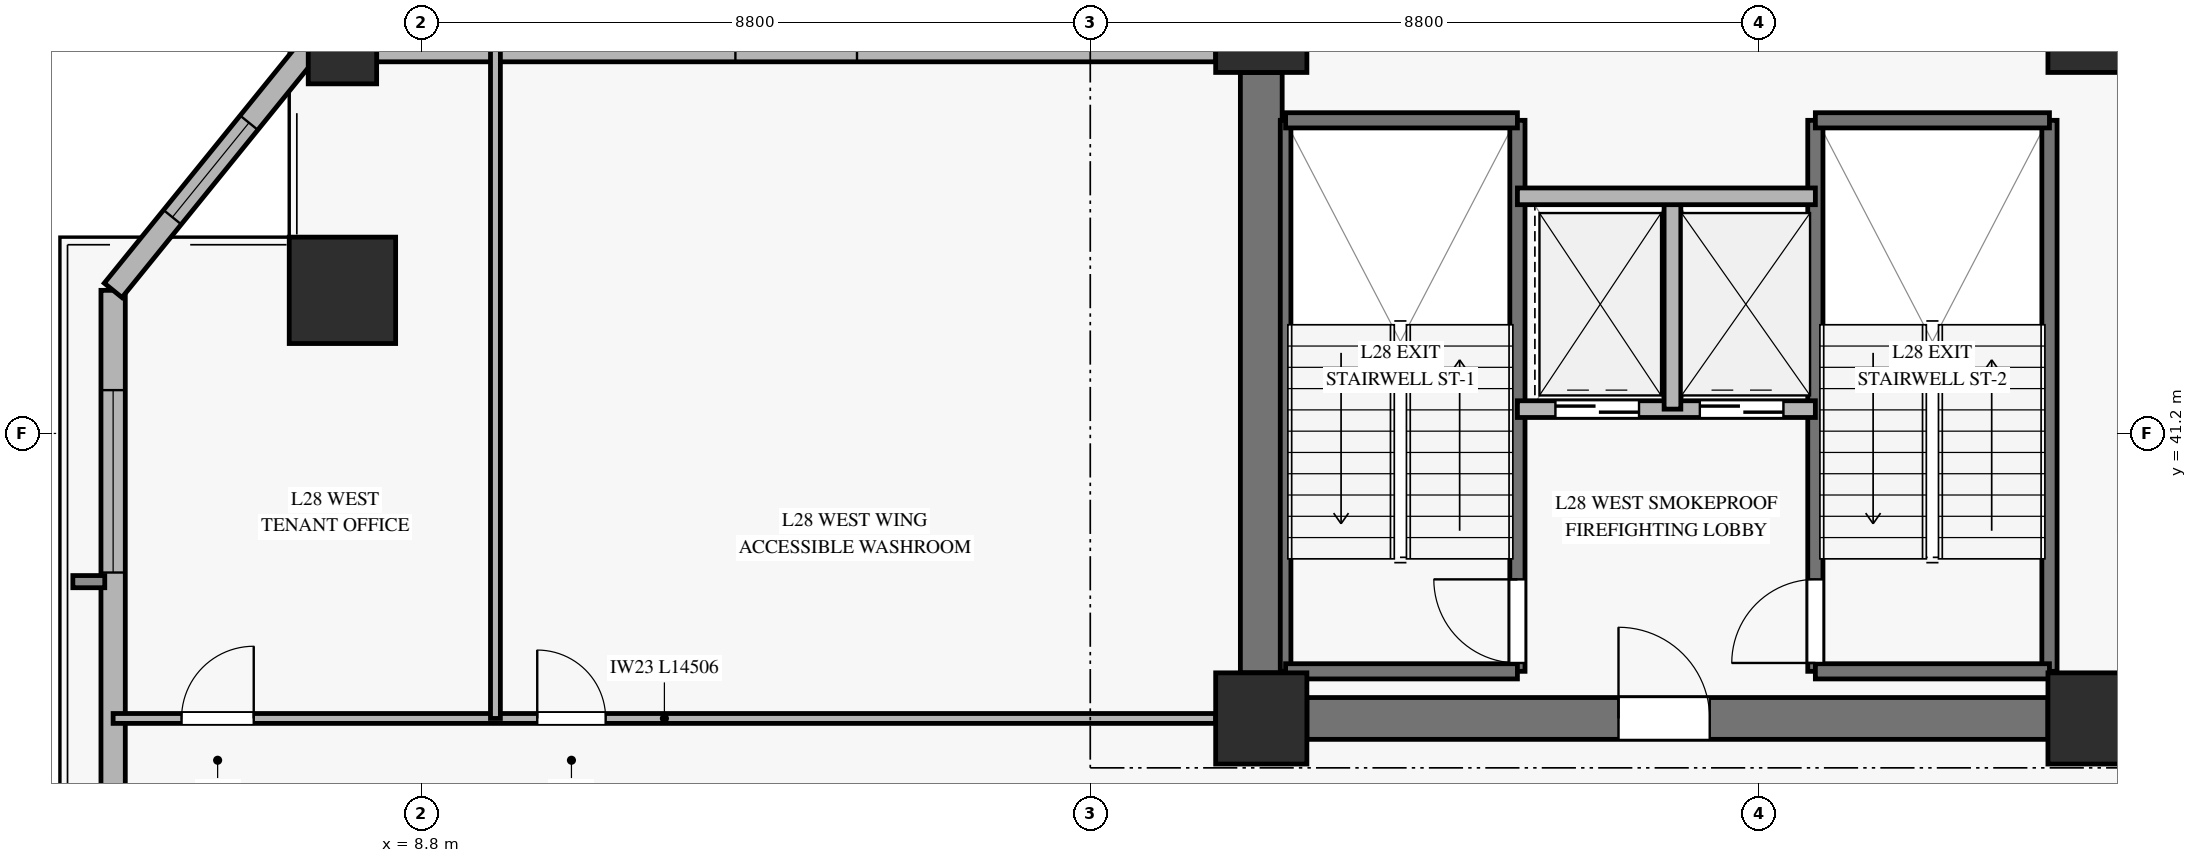
"""IFC4 building model, lengths in metres.
Left out: names, types, materials, properties, quantities, classifications, styles, units other than length and angle.
Written with IfcOpenShell. Run it as: python <this file> out.ifc"""

import sys

from ifc_helpers import new_model, si_unit, direction, frame, frame_2d, origin, origin_2d, place, context, subcontext, project, spatial, rectangle, hollow_rectangle, extrude, source, transform, mapped, element, fill, save


model = new_model("IFC4")
c1 = context("Model", 3, precision=1e-05, world=origin(), true_north=direction((0.0, 1.0)))
c2 = subcontext(c1, "Body", "Model", "MODEL_VIEW")
j1 = project(units=[si_unit("LENGTHUNIT", "METRE"), si_unit("PLANEANGLEUNIT", "RADIAN")], contexts=[c1])
p1 = place(None, origin())
s1 = spatial("IfcSite", under=j1, at=p1, CompositionType="ELEMENT")
p2 = place(p1, origin())
s2 = spatial("IfcBuilding", under=s1, at=p2, CompositionType="ELEMENT")
p3 = place(p2, frame((0.0, 0.0, 115.3)))
s3 = spatial("IfcBuildingStorey", under=s2, at=p3, CompositionType="ELEMENT", Elevation=115.3)
m1 = source(origin(), c2, "Body", "SweptSolid", [
    extrude(rectangle(XDim=1.2, YDim=1.2, at=origin_2d()), origin(), (0.0, 0.0, 1.0), 3.68),
])
for number, where, z_axis, x_axis in (
    (1, (19.85, 37.45, 0.0), (0.0, 0.0, 1.0), (1.0, 0.0, 0.0)),
    (2, (19.85, 46.55, 0.0), (0.0, 0.0, 1.0), (1.0, 0.0, 0.0)),
    (3, (30.8, 37.45, 0.0), (0.0, 0.0, 1.0), (1.0, 0.0, 0.0)),
    (4, (30.8, 46.55, 0.0), (0.0, 0.0, 1.0), (1.0, 0.0, 0.0)),
):
    element("IfcColumn", number, at=place(p3, frame(where, z_axis=z_axis, x_axis=x_axis)), inside=s3, PredefinedType="PILASTER", context=c2, shape_type="MappedRepresentation", body=[
        mapped(m1, transform((0.0, 0.0, 0.0), x_axis=(1.0, 0.0, 0.0), y_axis=(0.0, 1.0, 0.0), z_axis=(0.0, 0.0, 1.0), scale=1.0)),
    ])
p4 = place(p3, frame((20.45, 37.45, 0.0), z_axis=(0.0, 0.0, 1.0), x_axis=(1.0, 0.0, 0.0)))
e5 = element("IfcWall", 5, at=p4, inside=s3, PredefinedType="SHEAR", context=c2, shape_type="SweptSolid", body=[
    extrude(rectangle(XDim=9.75, YDim=0.55, at=frame_2d((4.875, 0.0))), origin(), (0.0, 0.0, 1.0), 3.68),
])
p5 = place(p4, frame((4.1, 0.0, 0.0)))
e6 = element("IfcOpeningElement", 6, at=p5, cuts=e5, PredefinedType="OPENING", context=c2, shape_type="SweptSolid", body=[
    extrude(rectangle(XDim=1.2, YDim=2.15, at=frame_2d((0.6, 1.075))), frame((0.0, 0.285, 0.0), z_axis=(0.0, -1.0, 0.0), x_axis=(1.0, 0.0, 0.0)), (0.0, 0.0, 1.0), 0.57),
])
p6 = place(p3, frame((19.85, 38.05, 0.0), z_axis=(0.0, 0.0, 1.0), x_axis=(0.0, 1.0, 0.0)))
e7 = element("IfcWall", 7, at=p6, inside=s3, PredefinedType="SHEAR", context=c2, shape_type="SweptSolid", body=[
    extrude(rectangle(XDim=7.9, YDim=0.55, at=frame_2d((3.95, 0.0))), origin(), (0.0, 0.0, 1.0), 3.68),
])
m2 = source(origin(), c2, "Body", "SweptSolid", [
    extrude(hollow_rectangle(XDim=1.4, YDim=1.4, WallThickness=0.065, at=origin_2d()), origin(), (0.0, 0.0, 1.0), 3.68),
])
p7 = place(p3, frame((7.761, 43.083, 0.0), z_axis=(0.0, 0.0, 1.0), x_axis=(1.0, 0.0, 0.0)))
e8 = element("IfcColumn", 8, at=p7, inside=s3, PredefinedType="COLUMN", context=c2, shape_type="MappedRepresentation", body=[
    mapped(m2, transform((0.0, 0.0, 0.0), x_axis=(1.0, 0.0, 0.0), y_axis=(0.0, 1.0, 0.0), z_axis=(0.0, 0.0, 1.0), scale=1.0)),
])
m3 = source(origin(), c2, "Body", "SweptSolid", [
    extrude(hollow_rectangle(XDim=0.9, YDim=0.9, WallThickness=0.04, at=origin_2d()), origin(), (0.0, 0.0, 1.0), 3.68),
])
p8 = place(p3, frame((7.761, 46.25, 0.0), z_axis=(0.0, 0.0, 1.0), x_axis=(1.0, 0.0, 0.0)))
e9 = element("IfcColumn", 9, at=p8, inside=s3, PredefinedType="COLUMN", context=c2, shape_type="MappedRepresentation", body=[
    mapped(m3, transform((0.0, 0.0, 0.0), x_axis=(1.0, 0.0, 0.0), y_axis=(0.0, 1.0, 0.0), z_axis=(0.0, 0.0, 1.0), scale=1.0)),
])
p9 = place(p3, frame((4.744, 26.995, 0.0), z_axis=(0.0, 0.0, 1.0), x_axis=(0.0, 1.0, 0.0)))
e10 = element("IfcWall", 10, at=p9, inside=s3, PredefinedType="SOLIDWALL", context=c2, shape_type="SweptSolid", body=[
    extrude(rectangle(XDim=16.088, YDim=0.32, at=frame_2d((8.044, 0.0))), origin(), (0.0, 0.0, 1.0), 3.16),
])
p10 = place(p9, frame((1.22, 0.0, 0.45)))
e11 = element("IfcOpeningElement", 11, at=p10, cuts=e10, PredefinedType="OPENING", context=c2, shape_type="SweptSolid", body=[
    extrude(rectangle(XDim=2.4, YDim=2.1, at=frame_2d((1.2, 1.05))), frame((0.0, 0.17, 0.0), z_axis=(0.0, -1.0, 0.0), x_axis=(1.0, 0.0, 0.0)), (0.0, 0.0, 1.0), 0.34),
])
p11 = place(p9, frame((12.375, 0.0, 0.45)))
e12 = element("IfcOpeningElement", 12, at=p11, cuts=e10, PredefinedType="OPENING", context=c2, shape_type="SweptSolid", body=[
    extrude(rectangle(XDim=2.4, YDim=2.1, at=frame_2d((1.2, 1.05))), frame((0.0, 0.17, 0.0), z_axis=(0.0, -1.0, 0.0), x_axis=(1.0, 0.0, 0.0)), (0.0, 0.0, 1.0), 0.34),
])
p12 = place(p3, frame((8.211, 46.25, 0.0), z_axis=(0.0, 0.0, 1.0), x_axis=(1.0, 0.0, 0.0)))
e13 = element("IfcWall", 13, at=p12, inside=s3, PredefinedType="SOLIDWALL", context=c2, shape_type="SweptSolid", body=[
    extrude(rectangle(XDim=11.039, YDim=0.32, at=frame_2d((5.52, 0.0))), origin(), (0.0, 0.0, 1.0), 3.16),
])
p13 = place(p12, frame((4.72, 0.0, 0.45)))
e14 = element("IfcOpeningElement", 14, at=p13, cuts=e13, PredefinedType="OPENING", context=c2, shape_type="SweptSolid", body=[
    extrude(rectangle(XDim=1.6, YDim=2.0, at=frame_2d((0.8, 1.0))), frame((0.0, 0.17, 0.0), z_axis=(0.0, -1.0, 0.0), x_axis=(1.0, 0.0, 0.0)), (0.0, 0.0, 1.0), 0.34),
])
p14 = place(p3, frame((7.311, 46.25, 0.0), z_axis=(0.0, 0.0, 1.0), x_axis=(-0.629699415949, -0.776838880047, 0.0)))
e15 = element("IfcWall", 15, at=p14, inside=s3, PredefinedType="SOLIDWALL", context=c2, shape_type="SweptSolid", body=[
    extrude(rectangle(XDim=4.077, YDim=0.3, at=frame_2d((2.038, 0.0))), origin(), (0.0, 0.0, 1.0), 3.16),
])
p15 = place(p14, frame((1.238, 0.0, 0.45)))
e16 = element("IfcOpeningElement", 16, at=p15, cuts=e15, PredefinedType="OPENING", context=c2, shape_type="SweptSolid", body=[
    extrude(rectangle(XDim=1.6, YDim=2.0, at=frame_2d((0.8, 1.0))), frame((0.0, 0.16, 0.0), z_axis=(0.0, -1.0, 0.0), x_axis=(1.0, 0.0, 0.0)), (0.0, 0.0, 1.0), 0.32),
])
p16 = place(p3, frame((20.17, 38.07, 0.0), z_axis=(0.0, 0.0, 1.0), x_axis=(0.0, 1.0, 0.0)))
e17 = element("IfcWall", 17, at=p16, inside=s3, PredefinedType="SOLIDWALL", context=c2, shape_type="SweptSolid", body=[
    extrude(rectangle(XDim=7.25, YDim=0.14, at=frame_2d((3.625, 0.0))), origin(), (0.0, 0.0, 1.0), 3.9),
])
p17 = place(p3, frame((23.22, 38.07, 0.0), z_axis=(0.0, 0.0, 1.0), x_axis=(0.0, 1.0, 0.0)))
e18 = element("IfcWall", 18, at=p17, inside=s3, PredefinedType="SOLIDWALL", context=c2, shape_type="SweptSolid", body=[
    extrude(rectangle(XDim=7.25, YDim=0.2, at=frame_2d((3.625, 0.0))), origin(), (0.0, 0.0, 1.0), 3.9),
])
p18 = place(p17, frame((0.11, 0.0, 0.0)))
e19 = element("IfcOpeningElement", 19, at=p18, cuts=e18, PredefinedType="OPENING", context=c2, shape_type="SweptSolid", body=[
    extrude(rectangle(XDim=1.1, YDim=2.15, at=frame_2d((0.55, 1.075))), frame((0.0, 0.11, 0.0), z_axis=(0.0, -1.0, 0.0), x_axis=(1.0, 0.0, 0.0)), (0.0, 0.0, 1.0), 0.22),
])
for number, where, z_axis, x_axis in (
    (20, (20.17, 45.32, 0.0), (0.0, 0.0, 1.0), (1.0, 0.0, 0.0)),
    (21, (20.17, 38.07, 0.0), (0.0, 0.0, 1.0), (1.0, 0.0, 0.0)),
):
    element("IfcWall", number, at=place(p3, frame(where, z_axis=z_axis, x_axis=x_axis)), inside=s3, PredefinedType="SOLIDWALL", context=c2, shape_type="SweptSolid", body=[
        extrude(rectangle(XDim=3.05, YDim=0.2, at=frame_2d((1.525, 0.0))), origin(), (0.0, 0.0, 1.0), 3.9),
    ])
p19 = place(p3, frame((27.14, 38.07, 0.0), z_axis=(0.0, 0.0, 1.0), x_axis=(0.0, 1.0, 0.0)))
e22 = element("IfcWall", 22, at=p19, inside=s3, PredefinedType="SOLIDWALL", context=c2, shape_type="SweptSolid", body=[
    extrude(rectangle(XDim=7.25, YDim=0.2, at=frame_2d((3.625, 0.0))), origin(), (0.0, 0.0, 1.0), 3.9),
])
p20 = place(p19, frame((0.11, 0.0, 0.0)))
e23 = element("IfcOpeningElement", 23, at=p20, cuts=e22, PredefinedType="OPENING", context=c2, shape_type="SweptSolid", body=[
    extrude(rectangle(XDim=1.1, YDim=2.15, at=frame_2d((0.55, 1.075))), frame((0.0, 0.11, 0.0), z_axis=(0.0, -1.0, 0.0), x_axis=(1.0, 0.0, 0.0)), (0.0, 0.0, 1.0), 0.22),
])
p21 = place(p3, frame((30.22, 38.07, 0.0), z_axis=(0.0, 0.0, 1.0), x_axis=(0.0, 1.0, 0.0)))
e24 = element("IfcWall", 24, at=p21, inside=s3, PredefinedType="SOLIDWALL", context=c2, shape_type="SweptSolid", body=[
    extrude(rectangle(XDim=7.25, YDim=0.2, at=frame_2d((3.625, 0.0))), origin(), (0.0, 0.0, 1.0), 3.9),
])
for number, where, z_axis, x_axis in (
    (25, (27.14, 45.32, 0.0), (0.0, 0.0, 1.0), (1.0, 0.0, 0.0)),
    (26, (27.14, 38.07, 0.0), (0.0, 0.0, 1.0), (1.0, 0.0, 0.0)),
):
    element("IfcWall", number, at=place(p3, frame(where, z_axis=z_axis, x_axis=x_axis)), inside=s3, PredefinedType="SOLIDWALL", context=c2, shape_type="SweptSolid", body=[
        extrude(rectangle(XDim=3.08, YDim=0.2, at=frame_2d((1.54, 0.0))), origin(), (0.0, 0.0, 1.0), 3.9),
    ])
p22 = place(p3, frame((23.22, 41.52, 0.0), z_axis=(0.0, 0.0, 1.0), x_axis=(1.0, 0.0, 0.0)))
e27 = element("IfcWall", 27, at=p22, inside=s3, PredefinedType="SOLIDWALL", context=c2, shape_type="SweptSolid", body=[
    extrude(rectangle(XDim=3.92, YDim=0.22, at=frame_2d((1.96, 0.0))), origin(), (0.0, 0.0, 1.0), 3.68),
])
p23 = place(p22, frame((0.5, 0.0, 0.0)))
e28 = element("IfcOpeningElement", 28, at=p23, cuts=e27, PredefinedType="OPENING", context=c2, shape_type="SweptSolid", body=[
    extrude(rectangle(XDim=1.1, YDim=2.2, at=frame_2d((0.55, 1.1))), frame((0.0, 0.12, 0.0), z_axis=(0.0, -1.0, 0.0), x_axis=(1.0, 0.0, 0.0)), (0.0, 0.0, 1.0), 0.24),
])
p24 = place(p22, frame((2.4, 0.0, 0.0)))
e29 = element("IfcOpeningElement", 29, at=p24, cuts=e27, PredefinedType="OPENING", context=c2, shape_type="SweptSolid", body=[
    extrude(rectangle(XDim=1.1, YDim=2.2, at=frame_2d((0.55, 1.1))), frame((0.0, 0.12, 0.0), z_axis=(0.0, -1.0, 0.0), x_axis=(1.0, 0.0, 0.0)), (0.0, 0.0, 1.0), 0.24),
])
p25 = place(p3, frame((25.26, 41.52, 0.0), z_axis=(0.0, 0.0, 1.0), x_axis=(0.0, 1.0, 0.0)))
e30 = element("IfcWall", 30, at=p25, inside=s3, PredefinedType="SOLIDWALL", context=c2, shape_type="SweptSolid", body=[
    extrude(rectangle(XDim=2.8, YDim=0.22, at=frame_2d((1.4, 0.0))), origin(), (0.0, 0.0, 1.0), 3.68),
])
p26 = place(p3, frame((23.22, 44.32, 0.0), z_axis=(0.0, 0.0, 1.0), x_axis=(1.0, 0.0, 0.0)))
e31 = element("IfcWall", 31, at=p26, inside=s3, PredefinedType="SOLIDWALL", context=c2, shape_type="SweptSolid", body=[
    extrude(rectangle(XDim=3.92, YDim=0.22, at=frame_2d((1.96, 0.0))), origin(), (0.0, 0.0, 1.0), 3.68),
])
p27 = place(p3, frame((4.744, 37.45, 0.0), z_axis=(0.0, 0.0, 1.0), x_axis=(1.0, 0.0, 0.0)))
e32 = element("IfcWall", 32, at=p27, inside=s3, PredefinedType="PARTITIONING", context=c2, shape_type="SweptSolid", body=[
    extrude(rectangle(XDim=14.506, YDim=0.13, at=frame_2d((7.253, 0.0))), origin(), (0.0, 0.0, 1.0), 3.165),
])
p28 = place(p27, frame((0.9, 0.0, 0.0)))
e33 = element("IfcOpeningElement", 33, at=p28, cuts=e32, PredefinedType="OPENING", context=c2, shape_type="SweptSolid", body=[
    extrude(rectangle(XDim=0.95, YDim=2.1, at=frame_2d((0.475, 1.05))), frame((0.0, 0.075, 0.0), z_axis=(0.0, -1.0, 0.0), x_axis=(1.0, 0.0, 0.0)), (0.0, 0.0, 1.0), 0.15),
])
p29 = place(p27, frame((5.58, 0.0, 0.0)))
e34 = element("IfcOpeningElement", 34, at=p29, cuts=e32, PredefinedType="OPENING", context=c2, shape_type="SweptSolid", body=[
    extrude(rectangle(XDim=0.9, YDim=2.1, at=frame_2d((0.45, 1.05))), frame((0.0, 0.075, 0.0), z_axis=(0.0, -1.0, 0.0), x_axis=(1.0, 0.0, 0.0)), (0.0, 0.0, 1.0), 0.15),
])
p30 = place(p3, frame((9.774, 37.45, 0.0), z_axis=(0.0, 0.0, 1.0), x_axis=(0.0, 1.0, 0.0)))
e35 = element("IfcWall", 35, at=p30, inside=s3, PredefinedType="PARTITIONING", context=c2, shape_type="SweptSolid", body=[
    extrude(rectangle(XDim=8.8, YDim=0.13, at=frame_2d((4.4, 0.0))), origin(), (0.0, 0.0, 1.0), 3.68),
])
m4 = source(origin(), c2, "Body", "SweptSolid", [
    extrude(rectangle(XDim=2.4, YDim=2.1, at=frame_2d((1.2, 1.05))), frame((0.0, 0.03, 0.0), z_axis=(0.0, -1.0, 0.0), x_axis=(1.0, 0.0, 0.0)), (0.0, 0.0, 1.0), 0.06),
])
p31 = place(p11, origin())
e36 = element("IfcWindow", 36, at=p31, inside=s3, PartitioningType="SINGLE_PANEL", PredefinedType="WINDOW", context=c2, shape_type="MappedRepresentation", body=[
    mapped(m4, transform((0.0, 0.0, 0.0), x_axis=(1.0, 0.0, 0.0), y_axis=(0.0, 1.0, 0.0), z_axis=(0.0, 0.0, 1.0), scale=1.0)),
])
fill(e12, e36)
m5 = source(origin(), c2, "Body", "SweptSolid", [
    extrude(rectangle(XDim=1.6, YDim=2.0, at=frame_2d((0.8, 1.0))), frame((0.0, 0.03, 0.0), z_axis=(0.0, -1.0, 0.0), x_axis=(1.0, 0.0, 0.0)), (0.0, 0.0, 1.0), 0.06),
])
p32 = place(p15, origin())
e37 = element("IfcWindow", 37, at=p32, inside=s3, PartitioningType="SINGLE_PANEL", PredefinedType="WINDOW", context=c2, shape_type="MappedRepresentation", body=[
    mapped(m5, transform((0.0, 0.0, 0.0), x_axis=(1.0, 0.0, 0.0), y_axis=(0.0, 1.0, 0.0), z_axis=(0.0, 0.0, 1.0), scale=1.0)),
])
fill(e16, e37)
m6 = source(origin(), c2, "Body", "SweptSolid", [
    extrude(rectangle(XDim=1.1, YDim=2.15, at=frame_2d((0.55, 1.075))), frame((0.0, 0.025, 0.0), z_axis=(0.0, -1.0, 0.0), x_axis=(1.0, 0.0, 0.0)), (0.0, 0.0, 1.0), 0.05),
])
p33 = place(p18, origin())
e38 = element("IfcDoor", 38, at=p33, inside=s3, OperationType="SINGLE_SWING_RIGHT", PredefinedType="DOOR", context=c2, shape_type="MappedRepresentation", body=[
    mapped(m6, transform((0.0, 0.0, 0.0), x_axis=(1.0, 0.0, 0.0), y_axis=(0.0, 1.0, 0.0), z_axis=(0.0, 0.0, 1.0), scale=1.0)),
])
fill(e19, e38)
p34 = place(p20, origin())
e39 = element("IfcDoor", 39, at=p34, inside=s3, OperationType="SINGLE_SWING_LEFT", PredefinedType="DOOR", context=c2, shape_type="MappedRepresentation", body=[
    mapped(m6, transform((0.0, 0.0, 0.0), x_axis=(1.0, 0.0, 0.0), y_axis=(0.0, 1.0, 0.0), z_axis=(0.0, 0.0, 1.0), scale=1.0)),
])
fill(e23, e39)
m7 = source(origin(), c2, "Body", "SweptSolid", [
    extrude(rectangle(XDim=1.1, YDim=2.2, at=frame_2d((0.55, 1.1))), frame((0.0, 0.025, 0.0), z_axis=(0.0, -1.0, 0.0), x_axis=(1.0, 0.0, 0.0)), (0.0, 0.0, 1.0), 0.05),
])
p35 = place(p23, origin())
e40 = element("IfcDoor", 40, at=p35, inside=s3, OperationType="SLIDING_TO_LEFT", PredefinedType="DOOR", context=c2, shape_type="MappedRepresentation", body=[
    mapped(m7, transform((0.0, 0.0, 0.0), x_axis=(1.0, 0.0, 0.0), y_axis=(0.0, 1.0, 0.0), z_axis=(0.0, 0.0, 1.0), scale=1.0)),
])
fill(e28, e40)
p36 = place(p24, origin())
e41 = element("IfcDoor", 41, at=p36, inside=s3, OperationType="SLIDING_TO_LEFT", PredefinedType="DOOR", context=c2, shape_type="MappedRepresentation", body=[
    mapped(m7, transform((0.0, 0.0, 0.0), x_axis=(1.0, 0.0, 0.0), y_axis=(0.0, 1.0, 0.0), z_axis=(0.0, 0.0, 1.0), scale=1.0)),
])
fill(e29, e41)
m8 = source(origin(), c2, "Body", "SweptSolid", [
    extrude(rectangle(XDim=1.2, YDim=2.15, at=frame_2d((0.6, 1.075))), frame((0.0, 0.025, 0.0), z_axis=(0.0, -1.0, 0.0), x_axis=(1.0, 0.0, 0.0)), (0.0, 0.0, 1.0), 0.05),
])
p37 = place(p5, origin())
e42 = element("IfcDoor", 42, at=p37, inside=s3, OperationType="SINGLE_SWING_LEFT", PredefinedType="DOOR", context=c2, shape_type="MappedRepresentation", body=[
    mapped(m8, transform((0.0, 0.0, 0.0), x_axis=(1.0, 0.0, 0.0), y_axis=(0.0, 1.0, 0.0), z_axis=(0.0, 0.0, 1.0), scale=1.0)),
])
fill(e6, e42)
m9 = source(origin(), c2, "Body", "SweptSolid", [
    extrude(rectangle(XDim=0.95, YDim=2.1, at=frame_2d((0.475, 1.05))), frame((0.0, 0.025, 0.0), z_axis=(0.0, -1.0, 0.0), x_axis=(1.0, 0.0, 0.0)), (0.0, 0.0, 1.0), 0.05),
])
p38 = place(p28, origin())
e43 = element("IfcDoor", 43, at=p38, inside=s3, OperationType="SINGLE_SWING_RIGHT", PredefinedType="DOOR", context=c2, shape_type="MappedRepresentation", body=[
    mapped(m9, transform((0.0, 0.0, 0.0), x_axis=(1.0, 0.0, 0.0), y_axis=(0.0, 1.0, 0.0), z_axis=(0.0, 0.0, 1.0), scale=1.0)),
])
fill(e33, e43)
m10 = source(origin(), c2, "Body", "SweptSolid", [
    extrude(rectangle(XDim=0.9, YDim=2.1, at=frame_2d((0.45, 1.05))), frame((0.0, 0.025, 0.0), z_axis=(0.0, -1.0, 0.0), x_axis=(1.0, 0.0, 0.0)), (0.0, 0.0, 1.0), 0.05),
])
p39 = place(p29, origin())
e44 = element("IfcDoor", 44, at=p39, inside=s3, OperationType="SINGLE_SWING_LEFT", PredefinedType="DOOR", context=c2, shape_type="MappedRepresentation", body=[
    mapped(m10, transform((0.0, 0.0, 0.0), x_axis=(1.0, 0.0, 0.0), y_axis=(0.0, 1.0, 0.0), z_axis=(0.0, 0.0, 1.0), scale=1.0)),
])
fill(e34, e44)
save(model, sys.argv[1])
